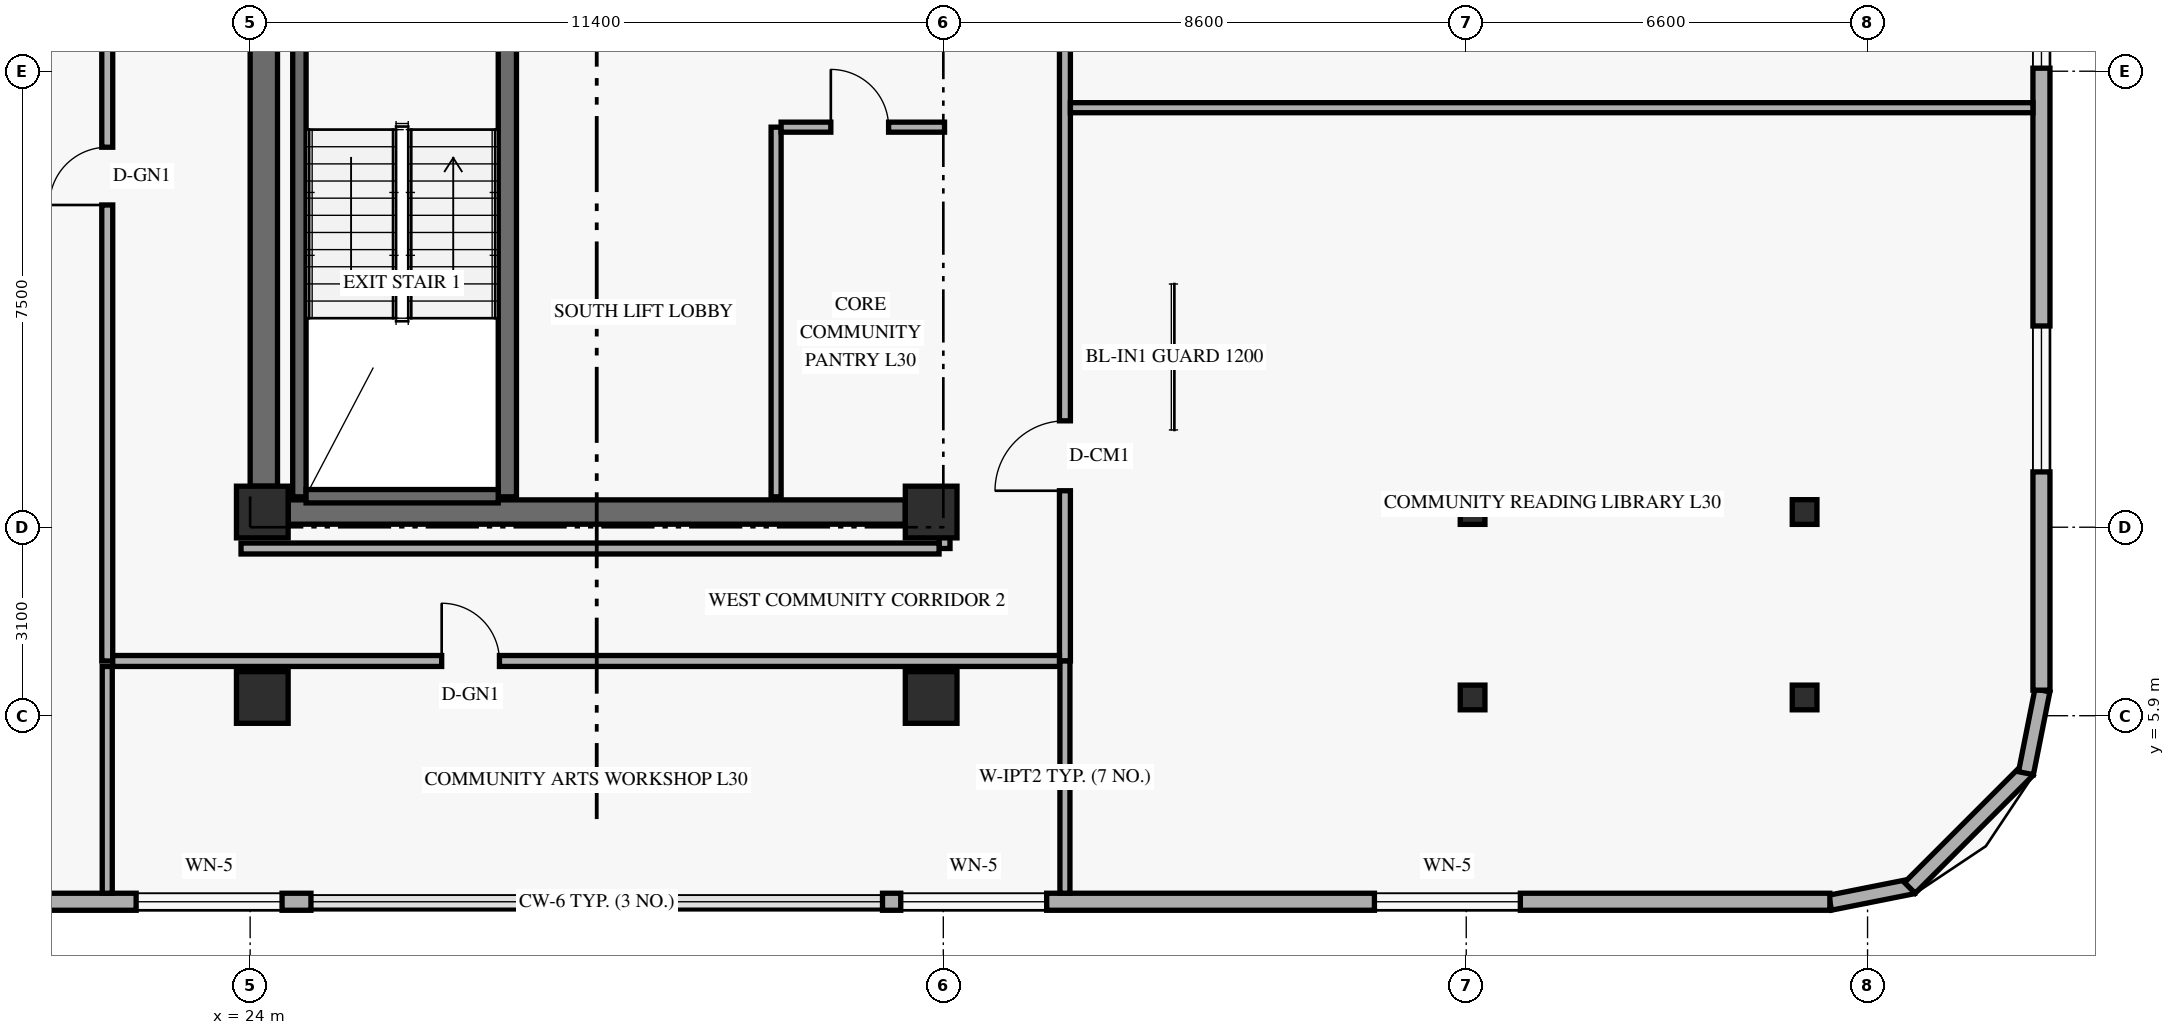
"""IFC4 building model, lengths in metres.
Left out: names, types, materials, properties, quantities, classifications, styles, units other than length and angle.
Written with IfcOpenShell. Run it as: python <this file> out.ifc"""

import sys

from ifc_helpers import new_model, si_unit, direction, frame, frame_2d, origin, origin_2d, place, context, subcontext, project, spatial, rectangle, hollow_rectangle, extrude, element, fill, save


model = new_model("IFC4")
c1 = context("Model", 3, precision=1e-05, world=origin(), true_north=direction((0.0, 1.0)))
c2 = subcontext(c1, "Body", "Model", "MODEL_VIEW")
j1 = project(units=[si_unit("LENGTHUNIT", "METRE"), si_unit("PLANEANGLEUNIT", "RADIAN")], contexts=[c1])
p1 = place(None, origin())
s1 = spatial("IfcSite", under=j1, at=p1, CompositionType="ELEMENT")
p2 = place(p1, origin())
s2 = spatial("IfcBuilding", under=s1, at=p2, CompositionType="ELEMENT")
p3 = place(p2, frame((0.0, 0.0, 117.0)))
s3 = spatial("IfcBuildingStorey", under=s2, at=p3, CompositionType="ELEMENT", Elevation=117.0)
p4 = place(p3, frame((24.225, 9.675, 0.0), z_axis=(0.0, 0.0, 1.0), x_axis=(0.0, 1.0, 0.0)))
e1 = element("IfcWall", 1, at=p4, inside=s3, PredefinedType="SHEAR", context=c2, shape_type="SweptSolid", body=[
    extrude(rectangle(XDim=7.45, YDim=0.45, at=frame_2d((3.725, 0.0))), origin(), (0.0, 0.0, 1.0), 3.349),
])
p5 = place(p3, frame((24.625, 9.25, 0.0), z_axis=(0.0, 0.0, 1.0), x_axis=(1.0, 0.0, 0.0)))
e2 = element("IfcWall", 2, at=p5, inside=s3, PredefinedType="SHEAR", context=c2, shape_type="SweptSolid", body=[
    extrude(rectangle(XDim=10.15, YDim=0.4, at=frame_2d((5.075, 0.0))), origin(), (0.0, 0.0, 1.0), 3.96),
])
p6 = place(p3, frame((24.81, 9.5, 0.0), z_axis=(0.0, 0.0, 1.0), x_axis=(0.0, 1.0, 0.0)))
e3 = element("IfcWall", 3, at=p6, inside=s3, PredefinedType="SHEAR", context=c2, shape_type="SweptSolid", body=[
    extrude(rectangle(XDim=7.76, YDim=0.22, at=frame_2d((3.88, 0.0))), origin(), (0.0, 0.0, 1.0), 3.96),
])
p7 = place(p3, frame((28.23, 9.5, 0.0), z_axis=(0.0, 0.0, 1.0), x_axis=(0.0, 1.0, 0.0)))
e4 = element("IfcWall", 4, at=p7, inside=s3, PredefinedType="SHEAR", context=c2, shape_type="SweptSolid", body=[
    extrude(rectangle(XDim=7.76, YDim=0.3, at=frame_2d((3.88, 0.0))), origin(), (0.0, 0.0, 1.0), 3.96),
])
p8 = place(p3, frame((24.92, 9.51, 0.0), z_axis=(0.0, 0.0, 1.0), x_axis=(1.0, 0.0, 0.0)))
e5 = element("IfcWall", 5, at=p8, inside=s3, PredefinedType="SHEAR", context=c2, shape_type="SweptSolid", body=[
    extrude(rectangle(XDim=3.16, YDim=0.22, at=frame_2d((1.58, 0.0))), origin(), (0.0, 0.0, 1.0), 3.96),
])
for number, where, z_axis, x_axis in (
    (6, (24.2, 6.2, 0.0), (0.0, 0.0, 1.0), (1.0, 0.0, 0.0)),
    (7, (24.2, 9.25, 0.0), (0.0, 0.0, 1.0), (1.0, 0.0, 0.0)),
    (8, (35.2, 6.2, 0.0), (0.0, 0.0, 1.0), (1.0, 0.0, 0.0)),
    (9, (35.2, 9.25, 0.0), (0.0, 0.0, 1.0), (1.0, 0.0, 0.0)),
):
    element("IfcColumn", number, at=place(p3, frame(where, z_axis=z_axis, x_axis=x_axis)), inside=s3, PredefinedType="COLUMN", context=c2, shape_type="SweptSolid", body=[
        extrude(rectangle(XDim=0.85, YDim=0.85, at=origin_2d()), origin(), (0.0, 0.0, 1.0), 4.2),
    ])
for number, where, z_axis, x_axis in (
    (10, (44.031, 6.2, 0.0), (0.035, 0.0, 0.999), (0.0, 1.0, 0.0)),
    (11, (44.031, 9.25, 0.0), (0.035, 0.0, 0.999), (0.0, 1.0, 0.0)),
):
    element("IfcColumn", number, at=place(p3, frame(where, z_axis=z_axis, x_axis=x_axis)), inside=s3, PredefinedType="COLUMN", context=c2, shape_type="SweptSolid", body=[
        extrude(hollow_rectangle(XDim=0.406, YDim=0.406, WallThickness=0.016, at=origin_2d()), origin(), (0.0, 0.0, 1.0), 4.203),
    ])
for number, where, z_axis, x_axis in (
    (12, (49.443, 6.2, 0.0), (0.058, 0.0, 0.998), (0.0, 1.0, 0.0)),
    (13, (49.443, 9.25, 0.0), (0.058, 0.0, 0.998), (0.0, 1.0, 0.0)),
):
    element("IfcColumn", number, at=place(p3, frame(where, z_axis=z_axis, x_axis=x_axis)), inside=s3, PredefinedType="COLUMN", context=c2, shape_type="SweptSolid", body=[
        extrude(hollow_rectangle(XDim=0.406, YDim=0.406, WallThickness=0.016, at=origin_2d()), origin(), (0.0, 0.0, 1.0), 4.207),
    ])
p9 = place(p3, frame((49.983, 2.824, 0.0), z_axis=(0.0, 0.0, 1.0), x_axis=(0.980809899341, 0.19496651342, 0.0)))
e14 = element("IfcWall", 14, at=p9, inside=s3, PredefinedType="SOLIDWALL", context=c2, shape_type="SweptSolid", body=[
    extrude(rectangle(XDim=1.389, YDim=0.25, at=frame_2d((0.694, 0.0))), origin(), (0.0, 0.0, 1.0), 3.96),
])
p10 = place(p3, frame((51.295, 3.068, 0.0), z_axis=(0.0, 0.0, 1.0), x_axis=(0.707151344399, 0.707062215165, 0.0)))
e15 = element("IfcWall", 15, at=p10, inside=s3, PredefinedType="SOLIDWALL", context=c2, shape_type="SweptSolid", body=[
    extrude(rectangle(XDim=2.739, YDim=0.25, at=frame_2d((1.37, 0.0))), origin(), (0.0, 0.0, 1.0), 3.96),
])
p11 = place(p3, frame((53.205, 4.955, 0.0), z_axis=(0.0, 0.0, 1.0), x_axis=(0.195000137217, 0.980803214965, 0.0)))
e16 = element("IfcWall", 16, at=p11, inside=s3, PredefinedType="SOLIDWALL", context=c2, shape_type="SweptSolid", body=[
    extrude(rectangle(XDim=1.388, YDim=0.25, at=frame_2d((0.694, 0.0))), origin(), (0.0, 0.0, 1.0), 3.96),
])
p12 = place(p3, frame((13.42, 2.84, 0.0), z_axis=(0.0, 0.0, 1.0), x_axis=(1.0, 0.0, 0.0)))
e17 = element("IfcWall", 17, at=p12, inside=s3, PredefinedType="SOLIDWALL", context=c2, shape_type="SweptSolid", body=[
    extrude(rectangle(XDim=11.58, YDim=0.28, at=frame_2d((5.79, 0.0))), origin(), (0.0, 0.0, 1.0), 3.96),
])
p13 = place(p12, frame((2.915, 0.0, 0.85)))
e18 = element("IfcOpeningElement", 18, at=p13, cuts=e17, PredefinedType="OPENING", context=c2, shape_type="SweptSolid", body=[
    extrude(rectangle(XDim=2.4, YDim=1.9, at=frame_2d((1.2, 0.95))), frame((0.0, 0.15, 0.0), z_axis=(0.0, -1.0, 0.0), x_axis=(1.0, 0.0, 0.0)), (0.0, 0.0, 1.0), 0.3),
])
p14 = place(p12, frame((8.705, 0.0, 0.85)))
e19 = element("IfcOpeningElement", 19, at=p14, cuts=e17, PredefinedType="OPENING", context=c2, shape_type="SweptSolid", body=[
    extrude(rectangle(XDim=2.4, YDim=1.9, at=frame_2d((1.2, 0.95))), frame((0.0, 0.15, 0.0), z_axis=(0.0, -1.0, 0.0), x_axis=(1.0, 0.0, 0.0)), (0.0, 0.0, 1.0), 0.3),
])
p15 = place(p3, frame((34.4, 2.84, 0.0), z_axis=(0.0, 0.0, 1.0), x_axis=(1.0, 0.0, 0.0)))
e20 = element("IfcWall", 20, at=p15, inside=s3, PredefinedType="SOLIDWALL", context=c2, shape_type="SweptSolid", body=[
    extrude(rectangle(XDim=15.58, YDim=0.28, at=frame_2d((7.79, 0.0))), origin(), (0.0, 0.0, 1.0), 3.96),
])
p16 = place(p15, frame((0.3, 0.0, 0.85)))
e21 = element("IfcOpeningElement", 21, at=p16, cuts=e20, PredefinedType="OPENING", context=c2, shape_type="SweptSolid", body=[
    extrude(rectangle(XDim=2.4, YDim=1.9, at=frame_2d((1.2, 0.95))), frame((0.0, 0.15, 0.0), z_axis=(0.0, -1.0, 0.0), x_axis=(1.0, 0.0, 0.0)), (0.0, 0.0, 1.0), 0.3),
])
p17 = place(p15, frame((8.09, 0.0, 0.85)))
e22 = element("IfcOpeningElement", 22, at=p17, cuts=e20, PredefinedType="OPENING", context=c2, shape_type="SweptSolid", body=[
    extrude(rectangle(XDim=2.4, YDim=1.9, at=frame_2d((1.2, 0.95))), frame((0.0, 0.15, 0.0), z_axis=(0.0, -1.0, 0.0), x_axis=(1.0, 0.0, 0.0)), (0.0, 0.0, 1.0), 0.3),
])
p18 = place(p3, frame((53.46, 6.32, 0.0), z_axis=(0.0, 0.0, 1.0), x_axis=(0.0, 1.0, 0.0)))
e23 = element("IfcWall", 23, at=p18, inside=s3, PredefinedType="SOLIDWALL", context=c2, shape_type="SweptSolid", body=[
    extrude(rectangle(XDim=12.08, YDim=0.28, at=frame_2d((6.04, 0.0))), origin(), (0.0, 0.0, 1.0), 3.96),
])
p19 = place(p18, frame((3.59, 0.0, 0.85)))
e24 = element("IfcOpeningElement", 24, at=p19, cuts=e23, PredefinedType="OPENING", context=c2, shape_type="SweptSolid", body=[
    extrude(rectangle(XDim=2.4, YDim=1.9, at=frame_2d((1.2, 0.95))), frame((0.0, 0.15, 0.0), z_axis=(0.0, -1.0, 0.0), x_axis=(1.0, 0.0, 0.0)), (0.0, 0.0, 1.0), 0.3),
])
p20 = place(p18, frame((10.23, 0.0, 0.85)))
e25 = element("IfcOpeningElement", 25, at=p20, cuts=e23, PredefinedType="OPENING", context=c2, shape_type="SweptSolid", body=[
    extrude(rectangle(XDim=1.2, YDim=1.5, at=frame_2d((0.6, 0.75))), frame((0.0, 0.15, 0.0), z_axis=(0.0, -1.0, 0.0), x_axis=(1.0, 0.0, 0.0)), (0.0, 0.0, 1.0), 0.3),
])
p21 = place(p3, frame((37.4, 6.8, 0.0), z_axis=(0.0, 0.0, 1.0), x_axis=(0.0, 1.0, 0.0)))
e26 = element("IfcWall", 26, at=p21, inside=s3, PredefinedType="STANDARD", context=c2, shape_type="SweptSolid", body=[
    extrude(rectangle(XDim=34.4, YDim=0.18, at=frame_2d((17.2, 0.0))), origin(), (0.0, 0.0, 1.0), 3.331),
])
p22 = place(p21, frame((25.57, 0.0, 0.0)))
e27 = element("IfcOpeningElement", 27, at=p22, cuts=e26, PredefinedType="OPENING", context=c2, shape_type="SweptSolid", body=[
    extrude(rectangle(XDim=0.92, YDim=2.14, at=frame_2d((0.46, 1.07))), frame((0.0, 0.1, 0.0), z_axis=(0.0, -1.0, 0.0), x_axis=(1.0, 0.0, 0.0)), (0.0, 0.0, 1.0), 0.2),
])
p23 = place(p21, frame((32.46, 0.0, 0.0)))
e28 = element("IfcOpeningElement", 28, at=p23, cuts=e26, PredefinedType="OPENING", context=c2, shape_type="SweptSolid", body=[
    extrude(rectangle(XDim=0.95, YDim=2.14, at=frame_2d((0.475, 1.07))), frame((0.0, 0.1, 0.0), z_axis=(0.0, -1.0, 0.0), x_axis=(1.0, 0.0, 0.0)), (0.0, 0.0, 1.0), 0.2),
])
p24 = place(p21, frame((2.8, 0.0, 0.0)))
e29 = element("IfcOpeningElement", 29, at=p24, cuts=e26, PredefinedType="OPENING", context=c2, shape_type="SweptSolid", body=[
    extrude(rectangle(XDim=1.15, YDim=2.15, at=frame_2d((0.575, 1.075))), frame((0.0, 0.1, 0.0), z_axis=(0.0, -1.0, 0.0), x_axis=(1.0, 0.0, 0.0)), (0.0, 0.0, 1.0), 0.2),
])
p25 = place(p21, frame((21.6, 0.0, 0.0)))
e30 = element("IfcOpeningElement", 30, at=p25, cuts=e26, PredefinedType="OPENING", context=c2, shape_type="SweptSolid", body=[
    extrude(rectangle(XDim=1.15, YDim=2.15, at=frame_2d((0.575, 1.075))), frame((0.0, 0.1, 0.0), z_axis=(0.0, -1.0, 0.0), x_axis=(1.0, 0.0, 0.0)), (0.0, 0.0, 1.0), 0.2),
])
p26 = place(p3, frame((37.4, 2.98, 0.0), z_axis=(0.0, 0.0, 1.0), x_axis=(0.0, 1.0, 0.0)))
e31 = element("IfcWall", 31, at=p26, inside=s3, PredefinedType="PARTITIONING", context=c2, shape_type="SweptSolid", body=[
    extrude(rectangle(XDim=3.82, YDim=0.165, at=frame_2d((1.91, 0.0))), origin(), (0.0, 0.0, 1.0), 3.409),
])
p27 = place(p3, frame((35.42, 8.65, 0.0), z_axis=(0.0, 0.0, 1.0), x_axis=(0.0, 1.0, 0.0)))
e32 = element("IfcWall", 32, at=p27, inside=s3, PredefinedType="STANDARD", context=c2, shape_type="SweptSolid", body=[
    extrude(rectangle(XDim=0.6, YDim=0.18, at=frame_2d((0.3, 0.0))), origin(), (0.0, 0.0, 1.0), 3.331),
])
p28 = place(p3, frame((37.49, 15.9, 0.0), z_axis=(0.0, 0.0, 1.0), x_axis=(1.0, 0.0, 0.0)))
e33 = element("IfcWall", 33, at=p28, inside=s3, PredefinedType="PARTITIONING", context=c2, shape_type="SweptSolid", body=[
    extrude(rectangle(XDim=15.83, YDim=0.165, at=frame_2d((7.915, 0.0))), origin(), (0.0, 0.0, 1.0), 3.331),
])
p29 = place(p3, frame((32.65, 9.5, 0.0), z_axis=(0.0, 0.0, 1.0), x_axis=(0.0, 1.0, 0.0)))
e34 = element("IfcWall", 34, at=p29, inside=s3, PredefinedType="PARTITIONING", context=c2, shape_type="SweptSolid", body=[
    extrude(rectangle(XDim=6.08, YDim=0.165, at=frame_2d((3.04, 0.0))), origin(), (0.0, 0.0, 1.0), 3.96),
])
p30 = place(p3, frame((32.732, 15.58, 0.0), z_axis=(0.0, 0.0, 1.0), x_axis=(1.0, 0.0, 0.0)))
e35 = element("IfcWall", 35, at=p30, inside=s3, PredefinedType="PARTITIONING", context=c2, shape_type="SweptSolid", body=[
    extrude(rectangle(XDim=2.688, YDim=0.165, at=frame_2d((1.344, 0.0))), origin(), (0.0, 0.0, 1.0), 3.331),
])
p31 = place(p30, frame((0.817, 0.0, 0.0)))
e36 = element("IfcOpeningElement", 36, at=p31, cuts=e35, PredefinedType="OPENING", context=c2, shape_type="SweptSolid", body=[
    extrude(rectangle(XDim=0.95, YDim=2.15, at=frame_2d((0.475, 1.075))), frame((0.0, 0.093, 0.0), z_axis=(0.0, -1.0, 0.0), x_axis=(1.0, 0.0, 0.0)), (0.0, 0.0, 1.0), 0.185),
])
p32 = place(p3, frame((21.65, 6.8, 0.0), z_axis=(0.0, 0.0, 1.0), x_axis=(0.0, 1.0, 0.0)))
e37 = element("IfcWall", 37, at=p32, inside=s3, PredefinedType="STANDARD", context=c2, shape_type="SweptSolid", body=[
    extrude(rectangle(XDim=34.4, YDim=0.18, at=frame_2d((17.2, 0.0))), origin(), (0.0, 0.0, 1.0), 3.331),
])
p33 = place(p32, frame((7.5, 0.0, 0.0)))
e38 = element("IfcOpeningElement", 38, at=p33, cuts=e37, PredefinedType="OPENING", context=c2, shape_type="SweptSolid", body=[
    extrude(rectangle(XDim=0.95, YDim=2.15, at=frame_2d((0.475, 1.075))), frame((0.0, 0.1, 0.0), z_axis=(0.0, -1.0, 0.0), x_axis=(1.0, 0.0, 0.0)), (0.0, 0.0, 1.0), 0.2),
])
p34 = place(p32, frame((22.5, 0.0, 0.0)))
e39 = element("IfcOpeningElement", 39, at=p34, cuts=e37, PredefinedType="OPENING", context=c2, shape_type="SweptSolid", body=[
    extrude(rectangle(XDim=0.95, YDim=2.15, at=frame_2d((0.475, 1.075))), frame((0.0, 0.1, 0.0), z_axis=(0.0, -1.0, 0.0), x_axis=(1.0, 0.0, 0.0)), (0.0, 0.0, 1.0), 0.2),
])
p35 = place(p3, frame((21.74, 6.8, 0.0), z_axis=(0.0, 0.0, 1.0), x_axis=(1.0, 0.0, 0.0)))
e40 = element("IfcWall", 40, at=p35, inside=s3, PredefinedType="STANDARD", context=c2, shape_type="SweptSolid", body=[
    extrude(rectangle(XDim=15.57, YDim=0.18, at=frame_2d((7.785, 0.0))), origin(), (0.0, 0.0, 1.0), 3.331),
])
p36 = place(p35, frame((5.41, 0.0, 0.0)))
e41 = element("IfcOpeningElement", 41, at=p36, cuts=e40, PredefinedType="OPENING", context=c2, shape_type="SweptSolid", body=[
    extrude(rectangle(XDim=0.95, YDim=2.15, at=frame_2d((0.475, 1.075))), frame((0.0, 0.1, 0.0), z_axis=(0.0, -1.0, 0.0), x_axis=(1.0, 0.0, 0.0)), (0.0, 0.0, 1.0), 0.2),
])
p37 = place(p3, frame((23.85, 8.65, 0.0), z_axis=(0.0, 0.0, 1.0), x_axis=(1.0, 0.0, 0.0)))
e42 = element("IfcWall", 42, at=p37, inside=s3, PredefinedType="STANDARD", context=c2, shape_type="SweptSolid", body=[
    extrude(rectangle(XDim=11.48, YDim=0.18, at=frame_2d((5.74, 0.0))), origin(), (0.0, 0.0, 1.0), 3.331),
])
p38 = place(p3, frame((21.65, 2.98, 0.0), z_axis=(0.0, 0.0, 1.0), x_axis=(0.0, 1.0, 0.0)))
e43 = element("IfcWall", 43, at=p38, inside=s3, PredefinedType="PARTITIONING", context=c2, shape_type="SweptSolid", body=[
    extrude(rectangle(XDim=3.73, YDim=0.165, at=frame_2d((1.865, 0.0))), origin(), (0.0, 0.0, 1.0), 3.409),
])
p39 = place(p14, origin())
e44 = element("IfcWindow", 44, at=p39, inside=s3, PartitioningType="SINGLE_PANEL", PredefinedType="WINDOW", context=c2, shape_type="SweptSolid", body=[
    extrude(rectangle(XDim=2.4, YDim=1.9, at=frame_2d((1.2, 0.95))), frame((0.0, 0.03, 0.0), z_axis=(0.0, -1.0, 0.0), x_axis=(1.0, 0.0, 0.0)), (0.0, 0.0, 1.0), 0.06),
])
fill(e19, e44)
p40 = place(p16, origin())
e45 = element("IfcWindow", 45, at=p40, inside=s3, PartitioningType="SINGLE_PANEL", PredefinedType="WINDOW", context=c2, shape_type="SweptSolid", body=[
    extrude(rectangle(XDim=2.4, YDim=1.9, at=frame_2d((1.2, 0.95))), frame((0.0, 0.03, 0.0), z_axis=(0.0, -1.0, 0.0), x_axis=(1.0, 0.0, 0.0)), (0.0, 0.0, 1.0), 0.06),
])
fill(e21, e45)
p41 = place(p17, origin())
e46 = element("IfcWindow", 46, at=p41, inside=s3, PartitioningType="SINGLE_PANEL", PredefinedType="WINDOW", context=c2, shape_type="SweptSolid", body=[
    extrude(rectangle(XDim=2.4, YDim=1.9, at=frame_2d((1.2, 0.95))), frame((0.0, 0.03, 0.0), z_axis=(0.0, -1.0, 0.0), x_axis=(1.0, 0.0, 0.0)), (0.0, 0.0, 1.0), 0.06),
])
fill(e22, e46)
p42 = place(p19, origin())
e47 = element("IfcWindow", 47, at=p42, inside=s3, PartitioningType="SINGLE_PANEL", PredefinedType="WINDOW", context=c2, shape_type="SweptSolid", body=[
    extrude(rectangle(XDim=2.4, YDim=1.9, at=frame_2d((1.2, 0.95))), frame((0.0, 0.03, 0.0), z_axis=(0.0, -1.0, 0.0), x_axis=(1.0, 0.0, 0.0)), (0.0, 0.0, 1.0), 0.06),
])
fill(e24, e47)
p43 = place(p20, origin())
e48 = element("IfcWindow", 48, at=p43, inside=s3, PartitioningType="SINGLE_PANEL", PredefinedType="WINDOW", context=c2, shape_type="SweptSolid", body=[
    extrude(rectangle(XDim=1.2, YDim=1.5, at=frame_2d((0.6, 0.75))), frame((0.0, 0.03, 0.0), z_axis=(0.0, -1.0, 0.0), x_axis=(1.0, 0.0, 0.0)), (0.0, 0.0, 1.0), 0.06),
])
fill(e25, e48)
p44 = place(p31, origin())
e49 = element("IfcDoor", 49, at=p44, inside=s3, OperationType="SINGLE_SWING_LEFT", PredefinedType="DOOR", context=c2, shape_type="SweptSolid", body=[
    extrude(rectangle(XDim=0.95, YDim=2.15, at=frame_2d((0.475, 1.075))), frame((0.0, 0.025, 0.0), z_axis=(0.0, -1.0, 0.0), x_axis=(1.0, 0.0, 0.0)), (0.0, 0.0, 1.0), 0.05),
])
fill(e36, e49)
p45 = place(p24, origin())
e50 = element("IfcDoor", 50, at=p45, inside=s3, OperationType="SINGLE_SWING_LEFT", PredefinedType="DOOR", context=c2, shape_type="SweptSolid", body=[
    extrude(rectangle(XDim=1.15, YDim=2.15, at=frame_2d((0.575, 1.075))), frame((0.0, 0.025, 0.0), z_axis=(0.0, -1.0, 0.0), x_axis=(1.0, 0.0, 0.0)), (0.0, 0.0, 1.0), 0.05),
])
fill(e29, e50)
p46 = place(p33, origin())
e51 = element("IfcDoor", 51, at=p46, inside=s3, OperationType="SINGLE_SWING_LEFT", PredefinedType="DOOR", context=c2, shape_type="SweptSolid", body=[
    extrude(rectangle(XDim=0.95, YDim=2.15, at=frame_2d((0.475, 1.075))), frame((0.0, 0.025, 0.0), z_axis=(0.0, -1.0, 0.0), x_axis=(1.0, 0.0, 0.0)), (0.0, 0.0, 1.0), 0.05),
])
fill(e38, e51)
p47 = place(p36, origin())
e52 = element("IfcDoor", 52, at=p47, inside=s3, OperationType="SINGLE_SWING_LEFT", PredefinedType="DOOR", context=c2, shape_type="SweptSolid", body=[
    extrude(rectangle(XDim=0.95, YDim=2.15, at=frame_2d((0.475, 1.075))), frame((0.0, 0.025, 0.0), z_axis=(0.0, -1.0, 0.0), x_axis=(1.0, 0.0, 0.0)), (0.0, 0.0, 1.0), 0.05),
])
fill(e41, e52)
save(model, sys.argv[1])
